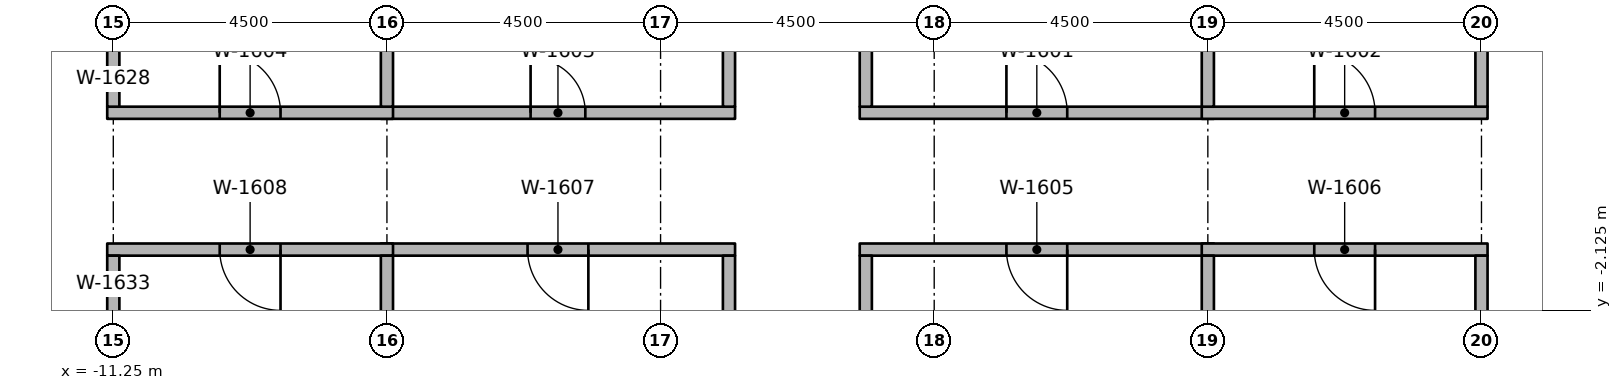
"""IFC4 building model, lengths in metres.
Left out: names, types, materials, properties, quantities, classifications, styles, units other than length and angle.
Written with IfcOpenShell. Run it as: python <this file> out.ifc"""

import sys

from ifc_helpers import new_model, si_unit, direction, frame, frame_2d, origin, place, context, subcontext, project, spatial, rectangle, extrude, element, fill, save


model = new_model("IFC4")
c1 = context("Model", 3, precision=1e-05, world=origin(), true_north=direction((0.0, 1.0)))
c2 = subcontext(c1, "Body", "Model", "MODEL_VIEW")
j1 = project(units=[si_unit("LENGTHUNIT", "METRE"), si_unit("PLANEANGLEUNIT", "RADIAN")], contexts=[c1])
p1 = place(None, origin())
s1 = spatial("IfcSite", under=j1, at=p1, CompositionType="ELEMENT")
p2 = place(p1, origin())
s2 = spatial("IfcBuilding", under=s1, at=p2, CompositionType="ELEMENT")
p3 = place(p2, frame((0.0, 0.0, 156.2)))
s3 = spatial("IfcBuildingStorey", under=s2, at=p3, CompositionType="ELEMENT", Elevation=156.2)
p4 = place(p3, frame((1.025, 1.125, 0.0), z_axis=(0.0, 0.0, 1.0), x_axis=(1.0, 0.0, 0.0)))
e1 = element("IfcWall", 1, at=p4, inside=s3, PredefinedType="PARTITIONING", context=c2, shape_type="SweptSolid", body=[
    extrude(rectangle(XDim=5.825, YDim=0.2, at=frame_2d((2.913, 0.0))), origin(), (0.0, 0.0, 1.0), 2.75),
])
p5 = place(p4, frame((2.413, 0.0, 0.0)))
e2 = element("IfcOpeningElement", 2, at=p5, cuts=e1, PredefinedType="OPENING", context=c2, shape_type="SweptSolid", body=[
    extrude(rectangle(XDim=1.0, YDim=2.1, at=frame_2d((0.5, 1.05))), frame((0.0, 0.11, 0.0), z_axis=(0.0, -1.0, 0.0), x_axis=(1.0, 0.0, 0.0)), (0.0, 0.0, 1.0), 0.22),
])
p6 = place(p3, frame((6.65, 1.125, 0.0), z_axis=(0.0, 0.0, 1.0), x_axis=(1.0, 0.0, 0.0)))
e3 = element("IfcWall", 3, at=p6, inside=s3, PredefinedType="PARTITIONING", context=c2, shape_type="SweptSolid", body=[
    extrude(rectangle(XDim=4.7, YDim=0.2, at=frame_2d((2.35, 0.0))), origin(), (0.0, 0.0, 1.0), 2.75),
])
p7 = place(p6, frame((1.85, 0.0, 0.0)))
e4 = element("IfcOpeningElement", 4, at=p7, cuts=e3, PredefinedType="OPENING", context=c2, shape_type="SweptSolid", body=[
    extrude(rectangle(XDim=1.0, YDim=2.1, at=frame_2d((0.5, 1.05))), frame((0.0, 0.11, 0.0), z_axis=(0.0, -1.0, 0.0), x_axis=(1.0, 0.0, 0.0)), (0.0, 0.0, 1.0), 0.22),
])
p8 = place(p3, frame((-6.85, 1.125, 0.0), z_axis=(0.0, 0.0, 1.0), x_axis=(1.0, 0.0, 0.0)))
e5 = element("IfcWall", 5, at=p8, inside=s3, PredefinedType="PARTITIONING", context=c2, shape_type="SweptSolid", body=[
    extrude(rectangle(XDim=5.825, YDim=0.2, at=frame_2d((2.913, 0.0))), origin(), (0.0, 0.0, 1.0), 2.75),
])
p9 = place(p8, frame((2.462, 0.0, 0.0)))
e6 = element("IfcOpeningElement", 6, at=p9, cuts=e5, PredefinedType="OPENING", context=c2, shape_type="SweptSolid", body=[
    extrude(rectangle(XDim=0.9, YDim=2.1, at=frame_2d((0.45, 1.05))), frame((0.0, 0.11, 0.0), z_axis=(0.0, -1.0, 0.0), x_axis=(1.0, 0.0, 0.0)), (0.0, 0.0, 1.0), 0.22),
])
p10 = place(p3, frame((-11.35, 1.125, 0.0), z_axis=(0.0, 0.0, 1.0), x_axis=(1.0, 0.0, 0.0)))
e7 = element("IfcWall", 7, at=p10, inside=s3, PredefinedType="PARTITIONING", context=c2, shape_type="SweptSolid", body=[
    extrude(rectangle(XDim=4.7, YDim=0.2, at=frame_2d((2.35, 0.0))), origin(), (0.0, 0.0, 1.0), 2.75),
])
p11 = place(p10, frame((1.85, 0.0, 0.0)))
e8 = element("IfcOpeningElement", 8, at=p11, cuts=e7, PredefinedType="OPENING", context=c2, shape_type="SweptSolid", body=[
    extrude(rectangle(XDim=1.0, YDim=2.1, at=frame_2d((0.5, 1.05))), frame((0.0, 0.11, 0.0), z_axis=(0.0, -1.0, 0.0), x_axis=(1.0, 0.0, 0.0)), (0.0, 0.0, 1.0), 0.22),
])
p12 = place(p3, frame((6.85, -1.125, 0.0), z_axis=(0.0, 0.0, 1.0), x_axis=(-1.0, 0.0, 0.0)))
e9 = element("IfcWall", 9, at=p12, inside=s3, PredefinedType="PARTITIONING", context=c2, shape_type="SweptSolid", body=[
    extrude(rectangle(XDim=5.825, YDim=0.2, at=frame_2d((2.913, 0.0))), origin(), (0.0, 0.0, 1.0), 2.75),
])
p13 = place(p12, frame((2.413, 0.0, 0.0)))
e10 = element("IfcOpeningElement", 10, at=p13, cuts=e9, PredefinedType="OPENING", context=c2, shape_type="SweptSolid", body=[
    extrude(rectangle(XDim=1.0, YDim=2.1, at=frame_2d((0.5, 1.05))), frame((0.0, 0.11, 0.0), z_axis=(0.0, -1.0, 0.0), x_axis=(1.0, 0.0, 0.0)), (0.0, 0.0, 1.0), 0.22),
])
p14 = place(p3, frame((11.35, -1.125, 0.0), z_axis=(0.0, 0.0, 1.0), x_axis=(-1.0, 0.0, 0.0)))
e11 = element("IfcWall", 11, at=p14, inside=s3, PredefinedType="PARTITIONING", context=c2, shape_type="SweptSolid", body=[
    extrude(rectangle(XDim=4.7, YDim=0.2, at=frame_2d((2.35, 0.0))), origin(), (0.0, 0.0, 1.0), 2.75),
])
p15 = place(p14, frame((1.85, 0.0, 0.0)))
e12 = element("IfcOpeningElement", 12, at=p15, cuts=e11, PredefinedType="OPENING", context=c2, shape_type="SweptSolid", body=[
    extrude(rectangle(XDim=1.0, YDim=2.1, at=frame_2d((0.5, 1.05))), frame((0.0, 0.11, 0.0), z_axis=(0.0, -1.0, 0.0), x_axis=(1.0, 0.0, 0.0)), (0.0, 0.0, 1.0), 0.22),
])
p16 = place(p3, frame((-1.025, -1.125, 0.0), z_axis=(0.0, 0.0, 1.0), x_axis=(-1.0, 0.0, 0.0)))
e13 = element("IfcWall", 13, at=p16, inside=s3, PredefinedType="PARTITIONING", context=c2, shape_type="SweptSolid", body=[
    extrude(rectangle(XDim=5.825, YDim=0.2, at=frame_2d((2.913, 0.0))), origin(), (0.0, 0.0, 1.0), 2.75),
])
p17 = place(p16, frame((2.413, 0.0, 0.0)))
e14 = element("IfcOpeningElement", 14, at=p17, cuts=e13, PredefinedType="OPENING", context=c2, shape_type="SweptSolid", body=[
    extrude(rectangle(XDim=1.0, YDim=2.1, at=frame_2d((0.5, 1.05))), frame((0.0, 0.11, 0.0), z_axis=(0.0, -1.0, 0.0), x_axis=(1.0, 0.0, 0.0)), (0.0, 0.0, 1.0), 0.22),
])
p18 = place(p3, frame((-6.65, -1.125, 0.0), z_axis=(0.0, 0.0, 1.0), x_axis=(-1.0, 0.0, 0.0)))
e15 = element("IfcWall", 15, at=p18, inside=s3, PredefinedType="PARTITIONING", context=c2, shape_type="SweptSolid", body=[
    extrude(rectangle(XDim=4.7, YDim=0.2, at=frame_2d((2.35, 0.0))), origin(), (0.0, 0.0, 1.0), 2.75),
])
p19 = place(p18, frame((1.85, 0.0, 0.0)))
e16 = element("IfcOpeningElement", 16, at=p19, cuts=e15, PredefinedType="OPENING", context=c2, shape_type="SweptSolid", body=[
    extrude(rectangle(XDim=1.0, YDim=2.1, at=frame_2d((0.5, 1.05))), frame((0.0, 0.11, 0.0), z_axis=(0.0, -1.0, 0.0), x_axis=(1.0, 0.0, 0.0)), (0.0, 0.0, 1.0), 0.22),
])
p20 = place(p3, frame((1.125, 1.225, 0.0), z_axis=(0.0, 0.0, 1.0), x_axis=(0.0, 1.0, 0.0)))
e17 = element("IfcWall", 17, at=p20, inside=s3, PredefinedType="PARTITIONING", context=c2, shape_type="SweptSolid", body=[
    extrude(rectangle(XDim=5.425, YDim=0.2, at=frame_2d((2.712, 0.0))), origin(), (0.0, 0.0, 1.0), 2.75),
])
p21 = place(p3, frame((-1.125, 1.225, 0.0), z_axis=(0.0, 0.0, 1.0), x_axis=(0.0, 1.0, 0.0)))
e18 = element("IfcWall", 18, at=p21, inside=s3, PredefinedType="PARTITIONING", context=c2, shape_type="SweptSolid", body=[
    extrude(rectangle(XDim=2.675, YDim=0.2, at=frame_2d((1.337, 0.0))), origin(), (0.0, 0.0, 1.0), 2.75),
])
for number, where, z_axis, x_axis in (
    (19, (1.125, -6.65, 0.0), (0.0, 0.0, 1.0), (0.0, 1.0, 0.0)),
    (20, (-1.125, -6.65, 0.0), (0.0, 0.0, 1.0), (0.0, 1.0, 0.0)),
    (21, (6.75, 1.225, 0.0), (0.0, 0.0, 1.0), (0.0, 1.0, 0.0)),
    (22, (11.25, 1.225, 0.0), (0.0, 0.0, 1.0), (0.0, 1.0, 0.0)),
):
    element("IfcWall", number, at=place(p3, frame(where, z_axis=z_axis, x_axis=x_axis)), inside=s3, PredefinedType="PARTITIONING", context=c2, shape_type="SweptSolid", body=[
        extrude(rectangle(XDim=5.425, YDim=0.2, at=frame_2d((2.712, 0.0))), origin(), (0.0, 0.0, 1.0), 2.75),
    ])
p22 = place(p3, frame((-6.75, 1.225, 0.0), z_axis=(0.0, 0.0, 1.0), x_axis=(0.0, 1.0, 0.0)))
e23 = element("IfcWall", 23, at=p22, inside=s3, PredefinedType="PARTITIONING", context=c2, shape_type="SweptSolid", body=[
    extrude(rectangle(XDim=2.675, YDim=0.2, at=frame_2d((1.337, 0.0))), origin(), (0.0, 0.0, 1.0), 2.75),
])
p23 = place(p3, frame((-11.25, 1.225, 0.0), z_axis=(0.0, 0.0, 1.0), x_axis=(0.0, 1.0, 0.0)))
e24 = element("IfcWall", 24, at=p23, inside=s3, PredefinedType="PARTITIONING", context=c2, shape_type="SweptSolid", body=[
    extrude(rectangle(XDim=0.925, YDim=0.2, at=frame_2d((0.462, 0.0))), origin(), (0.0, 0.0, 1.0), 2.75),
])
p24 = place(p3, frame((6.75, -6.65, 0.0), z_axis=(0.0, 0.0, 1.0), x_axis=(0.0, 1.0, 0.0)))
e25 = element("IfcWall", 25, at=p24, inside=s3, PredefinedType="PARTITIONING", context=c2, shape_type="SweptSolid", body=[
    extrude(rectangle(XDim=5.425, YDim=0.2, at=frame_2d((2.712, 0.0))), origin(), (0.0, 0.0, 1.0), 2.75),
])
p25 = place(p3, frame((11.25, -6.17, 0.0), z_axis=(0.0, 0.0, 1.0), x_axis=(0.0, 1.0, 0.0)))
e26 = element("IfcWall", 26, at=p25, inside=s3, PredefinedType="PARTITIONING", context=c2, shape_type="SweptSolid", body=[
    extrude(rectangle(XDim=4.945, YDim=0.2, at=frame_2d((2.472, 0.0))), origin(), (0.0, 0.0, 1.0), 2.75),
])
p26 = place(p3, frame((-6.75, -6.65, 0.0), z_axis=(0.0, 0.0, 1.0), x_axis=(0.0, 1.0, 0.0)))
e27 = element("IfcWall", 27, at=p26, inside=s3, PredefinedType="PARTITIONING", context=c2, shape_type="SweptSolid", body=[
    extrude(rectangle(XDim=5.425, YDim=0.2, at=frame_2d((2.712, 0.0))), origin(), (0.0, 0.0, 1.0), 2.75),
])
p27 = place(p3, frame((-11.25, -2.15, 0.0), z_axis=(0.0, 0.0, 1.0), x_axis=(0.0, 1.0, 0.0)))
e28 = element("IfcWall", 28, at=p27, inside=s3, PredefinedType="PARTITIONING", context=c2, shape_type="SweptSolid", body=[
    extrude(rectangle(XDim=0.925, YDim=0.2, at=frame_2d((0.462, 0.0))), origin(), (0.0, 0.0, 1.0), 2.75),
])
p28 = place(p5, origin())
e29 = element("IfcDoor", 29, at=p28, inside=s3, OperationType="SINGLE_SWING_RIGHT", PredefinedType="DOOR", context=c2, shape_type="SweptSolid", body=[
    extrude(rectangle(XDim=1.0, YDim=2.1, at=frame_2d((0.5, 1.05))), frame((0.0, 0.025, 0.0), z_axis=(0.0, -1.0, 0.0), x_axis=(1.0, 0.0, 0.0)), (0.0, 0.0, 1.0), 0.05),
])
fill(e2, e29)
p29 = place(p7, origin())
e30 = element("IfcDoor", 30, at=p29, inside=s3, OperationType="SINGLE_SWING_RIGHT", PredefinedType="DOOR", context=c2, shape_type="SweptSolid", body=[
    extrude(rectangle(XDim=1.0, YDim=2.1, at=frame_2d((0.5, 1.05))), frame((0.0, 0.025, 0.0), z_axis=(0.0, -1.0, 0.0), x_axis=(1.0, 0.0, 0.0)), (0.0, 0.0, 1.0), 0.05),
])
fill(e4, e30)
p30 = place(p9, origin())
e31 = element("IfcDoor", 31, at=p30, inside=s3, OperationType="SINGLE_SWING_RIGHT", PredefinedType="DOOR", context=c2, shape_type="SweptSolid", body=[
    extrude(rectangle(XDim=0.9, YDim=2.1, at=frame_2d((0.45, 1.05))), frame((0.0, 0.025, 0.0), z_axis=(0.0, -1.0, 0.0), x_axis=(1.0, 0.0, 0.0)), (0.0, 0.0, 1.0), 0.05),
])
fill(e6, e31)
p31 = place(p11, origin())
e32 = element("IfcDoor", 32, at=p31, inside=s3, OperationType="SINGLE_SWING_RIGHT", PredefinedType="DOOR", context=c2, shape_type="SweptSolid", body=[
    extrude(rectangle(XDim=1.0, YDim=2.1, at=frame_2d((0.5, 1.05))), frame((0.0, 0.025, 0.0), z_axis=(0.0, -1.0, 0.0), x_axis=(1.0, 0.0, 0.0)), (0.0, 0.0, 1.0), 0.05),
])
fill(e8, e32)
p32 = place(p13, origin())
e33 = element("IfcDoor", 33, at=p32, inside=s3, OperationType="SINGLE_SWING_RIGHT", PredefinedType="DOOR", context=c2, shape_type="SweptSolid", body=[
    extrude(rectangle(XDim=1.0, YDim=2.1, at=frame_2d((0.5, 1.05))), frame((0.0, 0.025, 0.0), z_axis=(0.0, -1.0, 0.0), x_axis=(1.0, 0.0, 0.0)), (0.0, 0.0, 1.0), 0.05),
])
fill(e10, e33)
p33 = place(p15, origin())
e34 = element("IfcDoor", 34, at=p33, inside=s3, OperationType="SINGLE_SWING_RIGHT", PredefinedType="DOOR", context=c2, shape_type="SweptSolid", body=[
    extrude(rectangle(XDim=1.0, YDim=2.1, at=frame_2d((0.5, 1.05))), frame((0.0, 0.025, 0.0), z_axis=(0.0, -1.0, 0.0), x_axis=(1.0, 0.0, 0.0)), (0.0, 0.0, 1.0), 0.05),
])
fill(e12, e34)
p34 = place(p17, origin())
e35 = element("IfcDoor", 35, at=p34, inside=s3, OperationType="SINGLE_SWING_RIGHT", PredefinedType="DOOR", context=c2, shape_type="SweptSolid", body=[
    extrude(rectangle(XDim=1.0, YDim=2.1, at=frame_2d((0.5, 1.05))), frame((0.0, 0.025, 0.0), z_axis=(0.0, -1.0, 0.0), x_axis=(1.0, 0.0, 0.0)), (0.0, 0.0, 1.0), 0.05),
])
fill(e14, e35)
p35 = place(p19, origin())
e36 = element("IfcDoor", 36, at=p35, inside=s3, OperationType="SINGLE_SWING_RIGHT", PredefinedType="DOOR", context=c2, shape_type="SweptSolid", body=[
    extrude(rectangle(XDim=1.0, YDim=2.1, at=frame_2d((0.5, 1.05))), frame((0.0, 0.025, 0.0), z_axis=(0.0, -1.0, 0.0), x_axis=(1.0, 0.0, 0.0)), (0.0, 0.0, 1.0), 0.05),
])
fill(e16, e36)
save(model, sys.argv[1])
